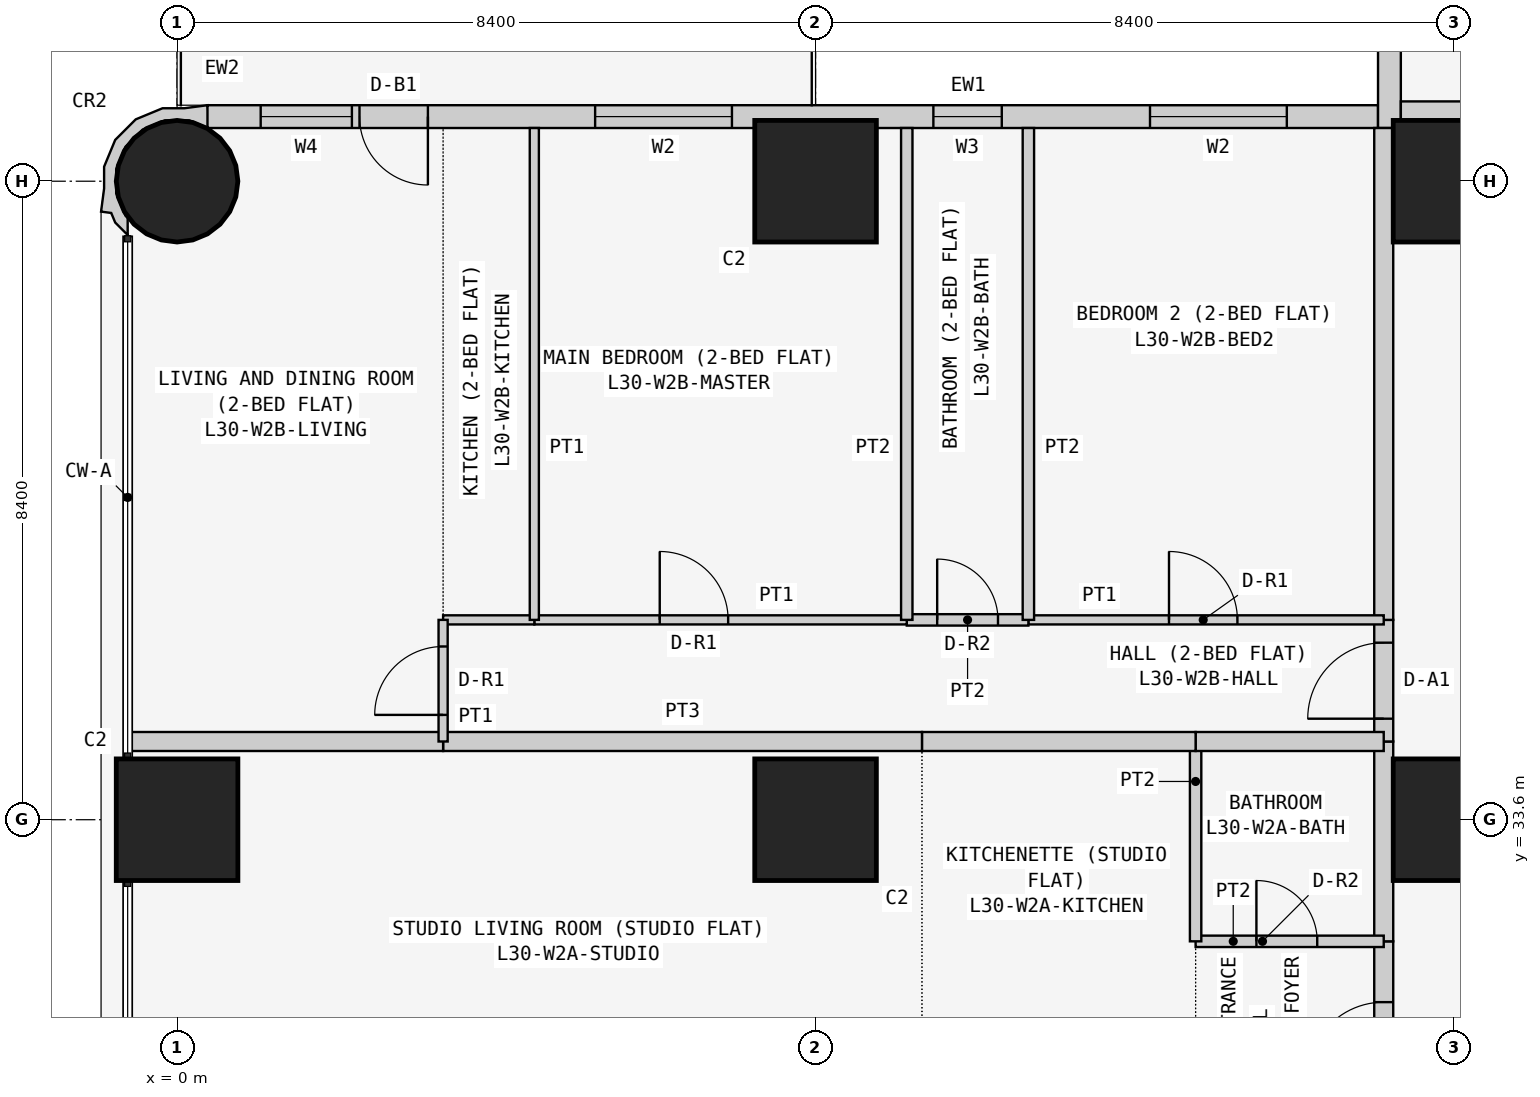
"""IFC4 building model, lengths in metres.
Left out: names, types, materials, properties, quantities, classifications, styles, units other than length and angle.
Written with IfcOpenShell. Run it as: python <this file> out.ifc"""

import sys

from ifc_helpers import new_model, si_unit, direction, frame, frame_2d, origin, origin_2d, place, context, subcontext, project, spatial, polyline, rectangle, circle, outline, extrude, element, fill, save


model = new_model("IFC4")
c1 = context("Model", 3, precision=1e-05, world=origin(), true_north=direction((0.0, 1.0)))
c2 = subcontext(c1, "Body", "Model", "MODEL_VIEW")
j1 = project(units=[si_unit("LENGTHUNIT", "METRE"), si_unit("PLANEANGLEUNIT", "RADIAN")], contexts=[c1])
p1 = place(None, origin())
s1 = spatial("IfcSite", under=j1, at=p1, CompositionType="ELEMENT")
p2 = place(p1, origin())
s2 = spatial("IfcBuilding", under=s1, at=p2, CompositionType="ELEMENT")
p3 = place(p2, frame((0.0, 0.0, 119.7)))
s3 = spatial("IfcBuildingStorey", under=s2, at=p3, CompositionType="ELEMENT", Elevation=119.7)
p4 = place(p3, frame((0.0, 33.6, 0.0), z_axis=(0.0, 0.0, 1.0), x_axis=(1.0, 0.0, 0.0)))
e1 = element("IfcColumn", 1, at=p4, inside=s3, PredefinedType="COLUMN", context=c2, shape_type="SweptSolid", body=[
    extrude(rectangle(XDim=1.6, YDim=1.6, at=origin_2d()), origin(), (0.0, 0.0, 1.0), 3.6),
])
p5 = place(p3, frame((0.0, 42.0, 0.0), z_axis=(0.0, 0.0, 1.0), x_axis=(1.0, 0.0, 0.0)))
e2 = element("IfcColumn", 2, at=p5, inside=s3, PredefinedType="COLUMN", context=c2, shape_type="SweptSolid", body=[
    extrude(circle(Radius=0.8, at=origin_2d()), origin(), (0.0, 0.0, 1.0), 3.6),
])
for number, where, z_axis, x_axis in (
    (3, (8.4, 33.6, 0.0), (0.0, 0.0, 1.0), (1.0, 0.0, 0.0)),
    (4, (8.4, 42.0, 0.0), (0.0, 0.0, 1.0), (1.0, 0.0, 0.0)),
    (5, (16.8, 33.6, 0.0), (0.0, 0.0, 1.0), (1.0, 0.0, 0.0)),
    (6, (16.8, 42.0, 0.0), (0.0, 0.0, 1.0), (1.0, 0.0, 0.0)),
):
    element("IfcColumn", number, at=place(p3, frame(where, z_axis=z_axis, x_axis=x_axis)), inside=s3, PredefinedType="COLUMN", context=c2, shape_type="SweptSolid", body=[
        extrude(rectangle(XDim=1.6, YDim=1.6, at=origin_2d()), origin(), (0.0, 0.0, 1.0), 3.6),
    ])
p6 = place(p3, frame((15.8, 42.85, 0.0), z_axis=(0.0, 0.0, 1.0), x_axis=(-1.0, 0.0, 0.0)))
e7 = element("IfcWall", 7, at=p6, inside=s3, PredefinedType="SOLIDWALL", context=c2, shape_type="SweptSolid", body=[
    extrude(rectangle(XDim=15.4, YDim=0.3, at=frame_2d((7.7, 0.0))), origin(), (0.0, 0.0, 1.0), 3.45),
])
p7 = place(p6, frame((1.2, 0.0, 0.9)))
e8 = element("IfcOpeningElement", 8, at=p7, cuts=e7, PredefinedType="OPENING", context=c2, shape_type="SweptSolid", body=[
    extrude(rectangle(XDim=1.8, YDim=1.5, at=frame_2d((0.9, 0.75))), frame((0.0, 0.16, 0.0), z_axis=(0.0, -1.0, 0.0), x_axis=(1.0, 0.0, 0.0)), (0.0, 0.0, 1.0), 0.32),
])
p8 = place(p6, frame((4.95, 0.0, 1.5)))
e9 = element("IfcOpeningElement", 9, at=p8, cuts=e7, PredefinedType="OPENING", context=c2, shape_type="SweptSolid", body=[
    extrude(rectangle(XDim=0.9, YDim=0.7, at=frame_2d((0.45, 0.35))), frame((0.0, 0.16, 0.0), z_axis=(0.0, -1.0, 0.0), x_axis=(1.0, 0.0, 0.0)), (0.0, 0.0, 1.0), 0.32),
])
p9 = place(p6, frame((8.5, 0.0, 0.9)))
e10 = element("IfcOpeningElement", 10, at=p9, cuts=e7, PredefinedType="OPENING", context=c2, shape_type="SweptSolid", body=[
    extrude(rectangle(XDim=1.8, YDim=1.5, at=frame_2d((0.9, 0.75))), frame((0.0, 0.16, 0.0), z_axis=(0.0, -1.0, 0.0), x_axis=(1.0, 0.0, 0.0)), (0.0, 0.0, 1.0), 0.32),
])
p10 = place(p6, frame((12.5, 0.0, 0.0)))
e11 = element("IfcOpeningElement", 11, at=p10, cuts=e7, PredefinedType="OPENING", context=c2, shape_type="SweptSolid", body=[
    extrude(rectangle(XDim=0.9, YDim=2.4, at=frame_2d((0.45, 1.2))), frame((0.0, 0.16, 0.0), z_axis=(0.0, -1.0, 0.0), x_axis=(1.0, 0.0, 0.0)), (0.0, 0.0, 1.0), 0.32),
])
p11 = place(p6, frame((13.5, 0.0, 0.9)))
e12 = element("IfcOpeningElement", 12, at=p11, cuts=e7, PredefinedType="OPENING", context=c2, shape_type="SweptSolid", body=[
    extrude(rectangle(XDim=1.2, YDim=1.5, at=frame_2d((0.6, 0.75))), frame((0.0, 0.16, 0.0), z_axis=(0.0, -1.0, 0.0), x_axis=(1.0, 0.0, 0.0)), (0.0, 0.0, 1.0), 0.32),
])
p12 = place(p3, frame((15.95, 50.0, 0.0), z_axis=(0.0, 0.0, 1.0), x_axis=(0.0, -1.0, 0.0)))
e13 = element("IfcWall", 13, at=p12, inside=s3, PredefinedType="SOLIDWALL", context=c2, shape_type="SweptSolid", body=[
    extrude(rectangle(XDim=7.3, YDim=0.3, at=frame_2d((3.65, 0.0))), origin(), (0.0, 0.0, 1.0), 3.45),
])
p13 = place(p12, frame((3.1, 0.0, 0.9)))
e14 = element("IfcOpeningElement", 14, at=p13, cuts=e13, PredefinedType="OPENING", context=c2, shape_type="SweptSolid", body=[
    extrude(rectangle(XDim=2.4, YDim=1.5, at=frame_2d((1.2, 0.75))), frame((0.0, 0.16, 0.0), z_axis=(0.0, -1.0, 0.0), x_axis=(1.0, 0.0, 0.0)), (0.0, 0.0, 1.0), 0.32),
])
p14 = place(p12, frame((0.75, 0.0, 0.9)))
e15 = element("IfcOpeningElement", 15, at=p14, cuts=e13, PredefinedType="OPENING", context=c2, shape_type="SweptSolid", body=[
    extrude(rectangle(XDim=1.2, YDim=1.5, at=frame_2d((0.6, 0.75))), frame((0.0, 0.16, 0.0), z_axis=(0.0, -1.0, 0.0), x_axis=(1.0, 0.0, 0.0)), (0.0, 0.0, 1.0), 0.32),
])
p15 = place(p3, frame((0.327, 42.817, 0.0), z_axis=(0.0, 0.0, 1.0), x_axis=(-0.93923434088, 0.343276641956, 0.0)))
e16 = element("IfcWall", 16, at=p15, inside=s3, PredefinedType="SOLIDWALL", context=c2, shape_type="SweptSolid", body=[
    extrude(outline(polyline([(-0.006, -0.197), (0.266, -0.055), (0.535, 0.044), (0.816, 0.302), (0.977, 0.648), (0.994, 1.03), (0.895, 1.299), (0.828, 1.598), (0.697, 1.569), (0.604, 1.67), (0.394, 1.767), (0.471, 1.556), (0.509, 1.539), (0.724, 1.304), (0.833, 1.005), (0.82, 0.687), (0.686, 0.397), (0.451, 0.182), (0.152, 0.073), (-0.116, 0.084), (-0.127, 0.078), (-0.146, 0.071), (-0.006, -0.197)])), origin(), (0.0, 0.0, 1.0), 3.45),
])
p16 = place(p3, frame((16.1, 42.925, 0.0), z_axis=(0.0, 0.0, 1.0), x_axis=(1.0, 0.0, 0.0)))
e17 = element("IfcWall", 17, at=p16, inside=s3, PredefinedType="PARTITIONING", context=c2, shape_type="SweptSolid", body=[
    extrude(rectangle(XDim=6.871, YDim=0.25, at=frame_2d((3.436, 0.0))), origin(), (0.0, 0.0, 1.0), 3.45),
])
p17 = place(p3, frame((15.875, 29.4, 0.0), z_axis=(0.0, 0.0, 1.0), x_axis=(0.0, 1.0, 0.0)))
e18 = element("IfcWall", 18, at=p17, inside=s3, PredefinedType="PARTITIONING", context=c2, shape_type="SweptSolid", body=[
    extrude(rectangle(XDim=2.6, YDim=0.25, at=frame_2d((1.3, 0.0))), origin(), (0.0, 0.0, 1.0), 3.45),
])
p18 = place(p17, frame((0.8, 0.0, 0.0)))
e19 = element("IfcOpeningElement", 19, at=p18, cuts=e18, PredefinedType="OPENING", context=c2, shape_type="SweptSolid", body=[
    extrude(rectangle(XDim=1.0, YDim=2.1, at=frame_2d((0.5, 1.05))), frame((0.0, 0.135, 0.0), z_axis=(0.0, -1.0, 0.0), x_axis=(1.0, 0.0, 0.0)), (0.0, 0.0, 1.0), 0.27),
])
p19 = place(p3, frame((15.875, 32.0, 0.0), z_axis=(0.0, 0.0, 1.0), x_axis=(0.0, 1.0, 0.0)))
e20 = element("IfcWall", 20, at=p19, inside=s3, PredefinedType="PARTITIONING", context=c2, shape_type="SweptSolid", body=[
    extrude(rectangle(XDim=2.629, YDim=0.25, at=frame_2d((1.314, 0.0))), origin(), (0.0, 0.0, 1.0), 3.45),
])
p20 = place(p3, frame((15.875, 34.629, 0.0), z_axis=(0.0, 0.0, 1.0), x_axis=(0.0, 1.0, 0.0)))
e21 = element("IfcWall", 21, at=p20, inside=s3, PredefinedType="PARTITIONING", context=c2, shape_type="SweptSolid", body=[
    extrude(rectangle(XDim=1.6, YDim=0.25, at=frame_2d((0.8, 0.0))), origin(), (0.0, 0.0, 1.0), 3.45),
])
p21 = place(p20, frame((0.3, 0.0, 0.0)))
e22 = element("IfcOpeningElement", 22, at=p21, cuts=e21, PredefinedType="OPENING", context=c2, shape_type="SweptSolid", body=[
    extrude(rectangle(XDim=1.0, YDim=2.1, at=frame_2d((0.5, 1.05))), frame((0.0, 0.135, 0.0), z_axis=(0.0, -1.0, 0.0), x_axis=(1.0, 0.0, 0.0)), (0.0, 0.0, 1.0), 0.27),
])
p22 = place(p3, frame((15.875, 36.229, 0.0), z_axis=(0.0, 0.0, 1.0), x_axis=(0.0, 1.0, 0.0)))
e23 = element("IfcWall", 23, at=p22, inside=s3, PredefinedType="PARTITIONING", context=c2, shape_type="SweptSolid", body=[
    extrude(rectangle(XDim=6.471, YDim=0.25, at=frame_2d((3.235, 0.0))), origin(), (0.0, 0.0, 1.0), 3.45),
])
p23 = place(p3, frame((13.4, 32.0, 0.0), z_axis=(0.0, 0.0, 1.0), x_axis=(1.0, 0.0, 0.0)))
e24 = element("IfcWall", 24, at=p23, inside=s3, PredefinedType="PARTITIONING", context=c2, shape_type="SweptSolid", body=[
    extrude(rectangle(XDim=2.475, YDim=0.15, at=frame_2d((1.238, 0.0))), origin(), (0.0, 0.0, 1.0), 3.45),
])
p24 = place(p23, frame((0.8, 0.0, 0.0)))
e25 = element("IfcOpeningElement", 25, at=p24, cuts=e24, PredefinedType="OPENING", context=c2, shape_type="SweptSolid", body=[
    extrude(rectangle(XDim=0.8, YDim=2.1, at=frame_2d((0.4, 1.05))), frame((0.0, 0.085, 0.0), z_axis=(0.0, -1.0, 0.0), x_axis=(1.0, 0.0, 0.0)), (0.0, 0.0, 1.0), 0.17),
])
p25 = place(p3, frame((13.4, 32.0, 0.0), z_axis=(0.0, 0.0, 1.0), x_axis=(0.0, 1.0, 0.0)))
e26 = element("IfcWall", 26, at=p25, inside=s3, PredefinedType="PARTITIONING", context=c2, shape_type="SweptSolid", body=[
    extrude(rectangle(XDim=2.629, YDim=0.15, at=frame_2d((1.314, 0.0))), origin(), (0.0, 0.0, 1.0), 3.45),
])
p26 = place(p3, frame((13.4, 34.629, 0.0), z_axis=(0.0, 0.0, 1.0), x_axis=(1.0, 0.0, 0.0)))
e27 = element("IfcWall", 27, at=p26, inside=s3, PredefinedType="PARTITIONING", context=c2, shape_type="SweptSolid", body=[
    extrude(rectangle(XDim=2.475, YDim=0.25, at=frame_2d((1.238, 0.0))), origin(), (0.0, 0.0, 1.0), 3.45),
])
p27 = place(p3, frame((9.8, 34.629, 0.0), z_axis=(0.0, 0.0, 1.0), x_axis=(1.0, 0.0, 0.0)))
e28 = element("IfcWall", 28, at=p27, inside=s3, PredefinedType="PARTITIONING", context=c2, shape_type="SweptSolid", body=[
    extrude(rectangle(XDim=3.6, YDim=0.25, at=frame_2d((1.8, 0.0))), origin(), (0.0, 0.0, 1.0), 3.45),
])
p28 = place(p3, frame((3.5, 34.629, 0.0), z_axis=(0.0, 0.0, 1.0), x_axis=(1.0, 0.0, 0.0)))
e29 = element("IfcWall", 29, at=p28, inside=s3, PredefinedType="PARTITIONING", context=c2, shape_type="SweptSolid", body=[
    extrude(rectangle(XDim=6.3, YDim=0.25, at=frame_2d((3.15, 0.0))), origin(), (0.0, 0.0, 1.0), 3.45),
])
p29 = place(p3, frame((-0.65, 34.629, 0.0), z_axis=(0.0, 0.0, 1.0), x_axis=(1.0, 0.0, 0.0)))
e30 = element("IfcWall", 30, at=p29, inside=s3, PredefinedType="PARTITIONING", context=c2, shape_type="SweptSolid", body=[
    extrude(rectangle(XDim=4.15, YDim=0.25, at=frame_2d((2.075, 0.0))), origin(), (0.0, 0.0, 1.0), 3.45),
])
p30 = place(p3, frame((11.2, 36.229, 0.0), z_axis=(0.0, 0.0, 1.0), x_axis=(1.0, 0.0, 0.0)))
e31 = element("IfcWall", 31, at=p30, inside=s3, PredefinedType="PARTITIONING", context=c2, shape_type="SweptSolid", body=[
    extrude(rectangle(XDim=4.675, YDim=0.12, at=frame_2d((2.337, 0.0))), origin(), (0.0, 0.0, 1.0), 3.45),
])
p31 = place(p30, frame((1.85, 0.0, 0.0)))
e32 = element("IfcOpeningElement", 32, at=p31, cuts=e31, PredefinedType="OPENING", context=c2, shape_type="SweptSolid", body=[
    extrude(rectangle(XDim=0.9, YDim=2.1, at=frame_2d((0.45, 1.05))), frame((0.0, 0.07, 0.0), z_axis=(0.0, -1.0, 0.0), x_axis=(1.0, 0.0, 0.0)), (0.0, 0.0, 1.0), 0.14),
])
p32 = place(p3, frame((9.6, 36.229, 0.0), z_axis=(0.0, 0.0, 1.0), x_axis=(1.0, 0.0, 0.0)))
e33 = element("IfcWall", 33, at=p32, inside=s3, PredefinedType="PARTITIONING", context=c2, shape_type="SweptSolid", body=[
    extrude(rectangle(XDim=1.6, YDim=0.15, at=frame_2d((0.8, 0.0))), origin(), (0.0, 0.0, 1.0), 3.45),
])
p33 = place(p32, frame((0.4, 0.0, 0.0)))
e34 = element("IfcOpeningElement", 34, at=p33, cuts=e33, PredefinedType="OPENING", context=c2, shape_type="SweptSolid", body=[
    extrude(rectangle(XDim=0.8, YDim=2.1, at=frame_2d((0.4, 1.05))), frame((0.0, 0.085, 0.0), z_axis=(0.0, -1.0, 0.0), x_axis=(1.0, 0.0, 0.0)), (0.0, 0.0, 1.0), 0.17),
])
p34 = place(p3, frame((4.7, 36.229, 0.0), z_axis=(0.0, 0.0, 1.0), x_axis=(1.0, 0.0, 0.0)))
e35 = element("IfcWall", 35, at=p34, inside=s3, PredefinedType="PARTITIONING", context=c2, shape_type="SweptSolid", body=[
    extrude(rectangle(XDim=4.9, YDim=0.12, at=frame_2d((2.45, 0.0))), origin(), (0.0, 0.0, 1.0), 3.45),
])
p35 = place(p34, frame((1.65, 0.0, 0.0)))
e36 = element("IfcOpeningElement", 36, at=p35, cuts=e35, PredefinedType="OPENING", context=c2, shape_type="SweptSolid", body=[
    extrude(rectangle(XDim=0.9, YDim=2.1, at=frame_2d((0.45, 1.05))), frame((0.0, 0.07, 0.0), z_axis=(0.0, -1.0, 0.0), x_axis=(1.0, 0.0, 0.0)), (0.0, 0.0, 1.0), 0.14),
])
p36 = place(p3, frame((3.5, 36.229, 0.0), z_axis=(0.0, 0.0, 1.0), x_axis=(1.0, 0.0, 0.0)))
e37 = element("IfcWall", 37, at=p36, inside=s3, PredefinedType="PARTITIONING", context=c2, shape_type="SweptSolid", body=[
    extrude(rectangle(XDim=1.2, YDim=0.12, at=frame_2d((0.6, 0.0))), origin(), (0.0, 0.0, 1.0), 3.45),
])
p37 = place(p3, frame((3.5, 34.629, 0.0), z_axis=(0.0, 0.0, 1.0), x_axis=(0.0, 1.0, 0.0)))
e38 = element("IfcWall", 38, at=p37, inside=s3, PredefinedType="PARTITIONING", context=c2, shape_type="SweptSolid", body=[
    extrude(rectangle(XDim=1.6, YDim=0.12, at=frame_2d((0.8, 0.0))), origin(), (0.0, 0.0, 1.0), 3.45),
])
p38 = place(p37, frame((0.35, 0.0, 0.0)))
e39 = element("IfcOpeningElement", 39, at=p38, cuts=e38, PredefinedType="OPENING", context=c2, shape_type="SweptSolid", body=[
    extrude(rectangle(XDim=0.9, YDim=2.1, at=frame_2d((0.45, 1.05))), frame((0.0, 0.07, 0.0), z_axis=(0.0, -1.0, 0.0), x_axis=(1.0, 0.0, 0.0)), (0.0, 0.0, 1.0), 0.14),
])
for number, where, z_axis, x_axis in (
    (40, (11.2, 36.229, 0.0), (0.0, 0.0, 1.0), (0.0, 1.0, 0.0)),
    (41, (9.6, 36.229, 0.0), (0.0, 0.0, 1.0), (0.0, 1.0, 0.0)),
):
    element("IfcWall", number, at=place(p3, frame(where, z_axis=z_axis, x_axis=x_axis)), inside=s3, PredefinedType="PARTITIONING", context=c2, shape_type="SweptSolid", body=[
        extrude(rectangle(XDim=6.471, YDim=0.15, at=frame_2d((3.235, 0.0))), origin(), (0.0, 0.0, 1.0), 3.45),
    ])
p39 = place(p3, frame((4.7, 36.229, 0.0), z_axis=(0.0, 0.0, 1.0), x_axis=(0.0, 1.0, 0.0)))
e42 = element("IfcWall", 42, at=p39, inside=s3, PredefinedType="PARTITIONING", context=c2, shape_type="SweptSolid", body=[
    extrude(rectangle(XDim=6.471, YDim=0.12, at=frame_2d((3.235, 0.0))), origin(), (0.0, 0.0, 1.0), 3.45),
])
p40 = place(p7, origin())
e43 = element("IfcWindow", 43, at=p40, inside=s3, PartitioningType="SINGLE_PANEL", PredefinedType="WINDOW", context=c2, shape_type="SweptSolid", body=[
    extrude(rectangle(XDim=1.8, YDim=1.5, at=frame_2d((0.9, 0.75))), frame((0.0, 0.03, 0.0), z_axis=(0.0, -1.0, 0.0), x_axis=(1.0, 0.0, 0.0)), (0.0, 0.0, 1.0), 0.06),
])
fill(e8, e43)
p41 = place(p8, origin())
e44 = element("IfcWindow", 44, at=p41, inside=s3, PartitioningType="SINGLE_PANEL", PredefinedType="WINDOW", context=c2, shape_type="SweptSolid", body=[
    extrude(rectangle(XDim=0.9, YDim=0.7, at=frame_2d((0.45, 0.35))), frame((0.0, 0.03, 0.0), z_axis=(0.0, -1.0, 0.0), x_axis=(1.0, 0.0, 0.0)), (0.0, 0.0, 1.0), 0.06),
])
fill(e9, e44)
p42 = place(p9, origin())
e45 = element("IfcWindow", 45, at=p42, inside=s3, PartitioningType="SINGLE_PANEL", PredefinedType="WINDOW", context=c2, shape_type="SweptSolid", body=[
    extrude(rectangle(XDim=1.8, YDim=1.5, at=frame_2d((0.9, 0.75))), frame((0.0, 0.03, 0.0), z_axis=(0.0, -1.0, 0.0), x_axis=(1.0, 0.0, 0.0)), (0.0, 0.0, 1.0), 0.06),
])
fill(e10, e45)
p43 = place(p10, origin())
e46 = element("IfcDoor", 46, at=p43, inside=s3, OperationType="SINGLE_SWING_LEFT", PredefinedType="DOOR", context=c2, shape_type="SweptSolid", body=[
    extrude(rectangle(XDim=0.9, YDim=2.4, at=frame_2d((0.45, 1.2))), frame((0.0, 0.025, 0.0), z_axis=(0.0, -1.0, 0.0), x_axis=(1.0, 0.0, 0.0)), (0.0, 0.0, 1.0), 0.05),
])
fill(e11, e46)
p44 = place(p11, origin())
e47 = element("IfcWindow", 47, at=p44, inside=s3, PartitioningType="SINGLE_PANEL", PredefinedType="WINDOW", context=c2, shape_type="SweptSolid", body=[
    extrude(rectangle(XDim=1.2, YDim=1.5, at=frame_2d((0.6, 0.75))), frame((0.0, 0.03, 0.0), z_axis=(0.0, -1.0, 0.0), x_axis=(1.0, 0.0, 0.0)), (0.0, 0.0, 1.0), 0.06),
])
fill(e12, e47)
p45 = place(p18, origin())
e48 = element("IfcDoor", 48, at=p45, inside=s3, OperationType="SINGLE_SWING_LEFT", PredefinedType="DOOR", context=c2, shape_type="SweptSolid", body=[
    extrude(rectangle(XDim=1.0, YDim=2.1, at=frame_2d((0.5, 1.05))), frame((0.0, 0.025, 0.0), z_axis=(0.0, -1.0, 0.0), x_axis=(1.0, 0.0, 0.0)), (0.0, 0.0, 1.0), 0.05),
])
fill(e19, e48)
p46 = place(p24, origin())
e49 = element("IfcDoor", 49, at=p46, inside=s3, OperationType="SINGLE_SWING_LEFT", PredefinedType="DOOR", context=c2, shape_type="SweptSolid", body=[
    extrude(rectangle(XDim=0.8, YDim=2.1, at=frame_2d((0.4, 1.05))), frame((0.0, 0.025, 0.0), z_axis=(0.0, -1.0, 0.0), x_axis=(1.0, 0.0, 0.0)), (0.0, 0.0, 1.0), 0.05),
])
fill(e25, e49)
p47 = place(p21, origin())
e50 = element("IfcDoor", 50, at=p47, inside=s3, OperationType="SINGLE_SWING_LEFT", PredefinedType="DOOR", context=c2, shape_type="SweptSolid", body=[
    extrude(rectangle(XDim=1.0, YDim=2.1, at=frame_2d((0.5, 1.05))), frame((0.0, 0.025, 0.0), z_axis=(0.0, -1.0, 0.0), x_axis=(1.0, 0.0, 0.0)), (0.0, 0.0, 1.0), 0.05),
])
fill(e22, e50)
p48 = place(p31, origin())
e51 = element("IfcDoor", 51, at=p48, inside=s3, OperationType="SINGLE_SWING_LEFT", PredefinedType="DOOR", context=c2, shape_type="SweptSolid", body=[
    extrude(rectangle(XDim=0.9, YDim=2.1, at=frame_2d((0.45, 1.05))), frame((0.0, 0.025, 0.0), z_axis=(0.0, -1.0, 0.0), x_axis=(1.0, 0.0, 0.0)), (0.0, 0.0, 1.0), 0.05),
])
fill(e32, e51)
p49 = place(p33, origin())
e52 = element("IfcDoor", 52, at=p49, inside=s3, OperationType="SINGLE_SWING_LEFT", PredefinedType="DOOR", context=c2, shape_type="SweptSolid", body=[
    extrude(rectangle(XDim=0.8, YDim=2.1, at=frame_2d((0.4, 1.05))), frame((0.0, 0.025, 0.0), z_axis=(0.0, -1.0, 0.0), x_axis=(1.0, 0.0, 0.0)), (0.0, 0.0, 1.0), 0.05),
])
fill(e34, e52)
p50 = place(p35, origin())
e53 = element("IfcDoor", 53, at=p50, inside=s3, OperationType="SINGLE_SWING_LEFT", PredefinedType="DOOR", context=c2, shape_type="SweptSolid", body=[
    extrude(rectangle(XDim=0.9, YDim=2.1, at=frame_2d((0.45, 1.05))), frame((0.0, 0.025, 0.0), z_axis=(0.0, -1.0, 0.0), x_axis=(1.0, 0.0, 0.0)), (0.0, 0.0, 1.0), 0.05),
])
fill(e36, e53)
p51 = place(p38, origin())
e54 = element("IfcDoor", 54, at=p51, inside=s3, OperationType="SINGLE_SWING_LEFT", PredefinedType="DOOR", context=c2, shape_type="SweptSolid", body=[
    extrude(rectangle(XDim=0.9, YDim=2.1, at=frame_2d((0.45, 1.05))), frame((0.0, 0.025, 0.0), z_axis=(0.0, -1.0, 0.0), x_axis=(1.0, 0.0, 0.0)), (0.0, 0.0, 1.0), 0.05),
])
fill(e39, e54)
save(model, sys.argv[1])
